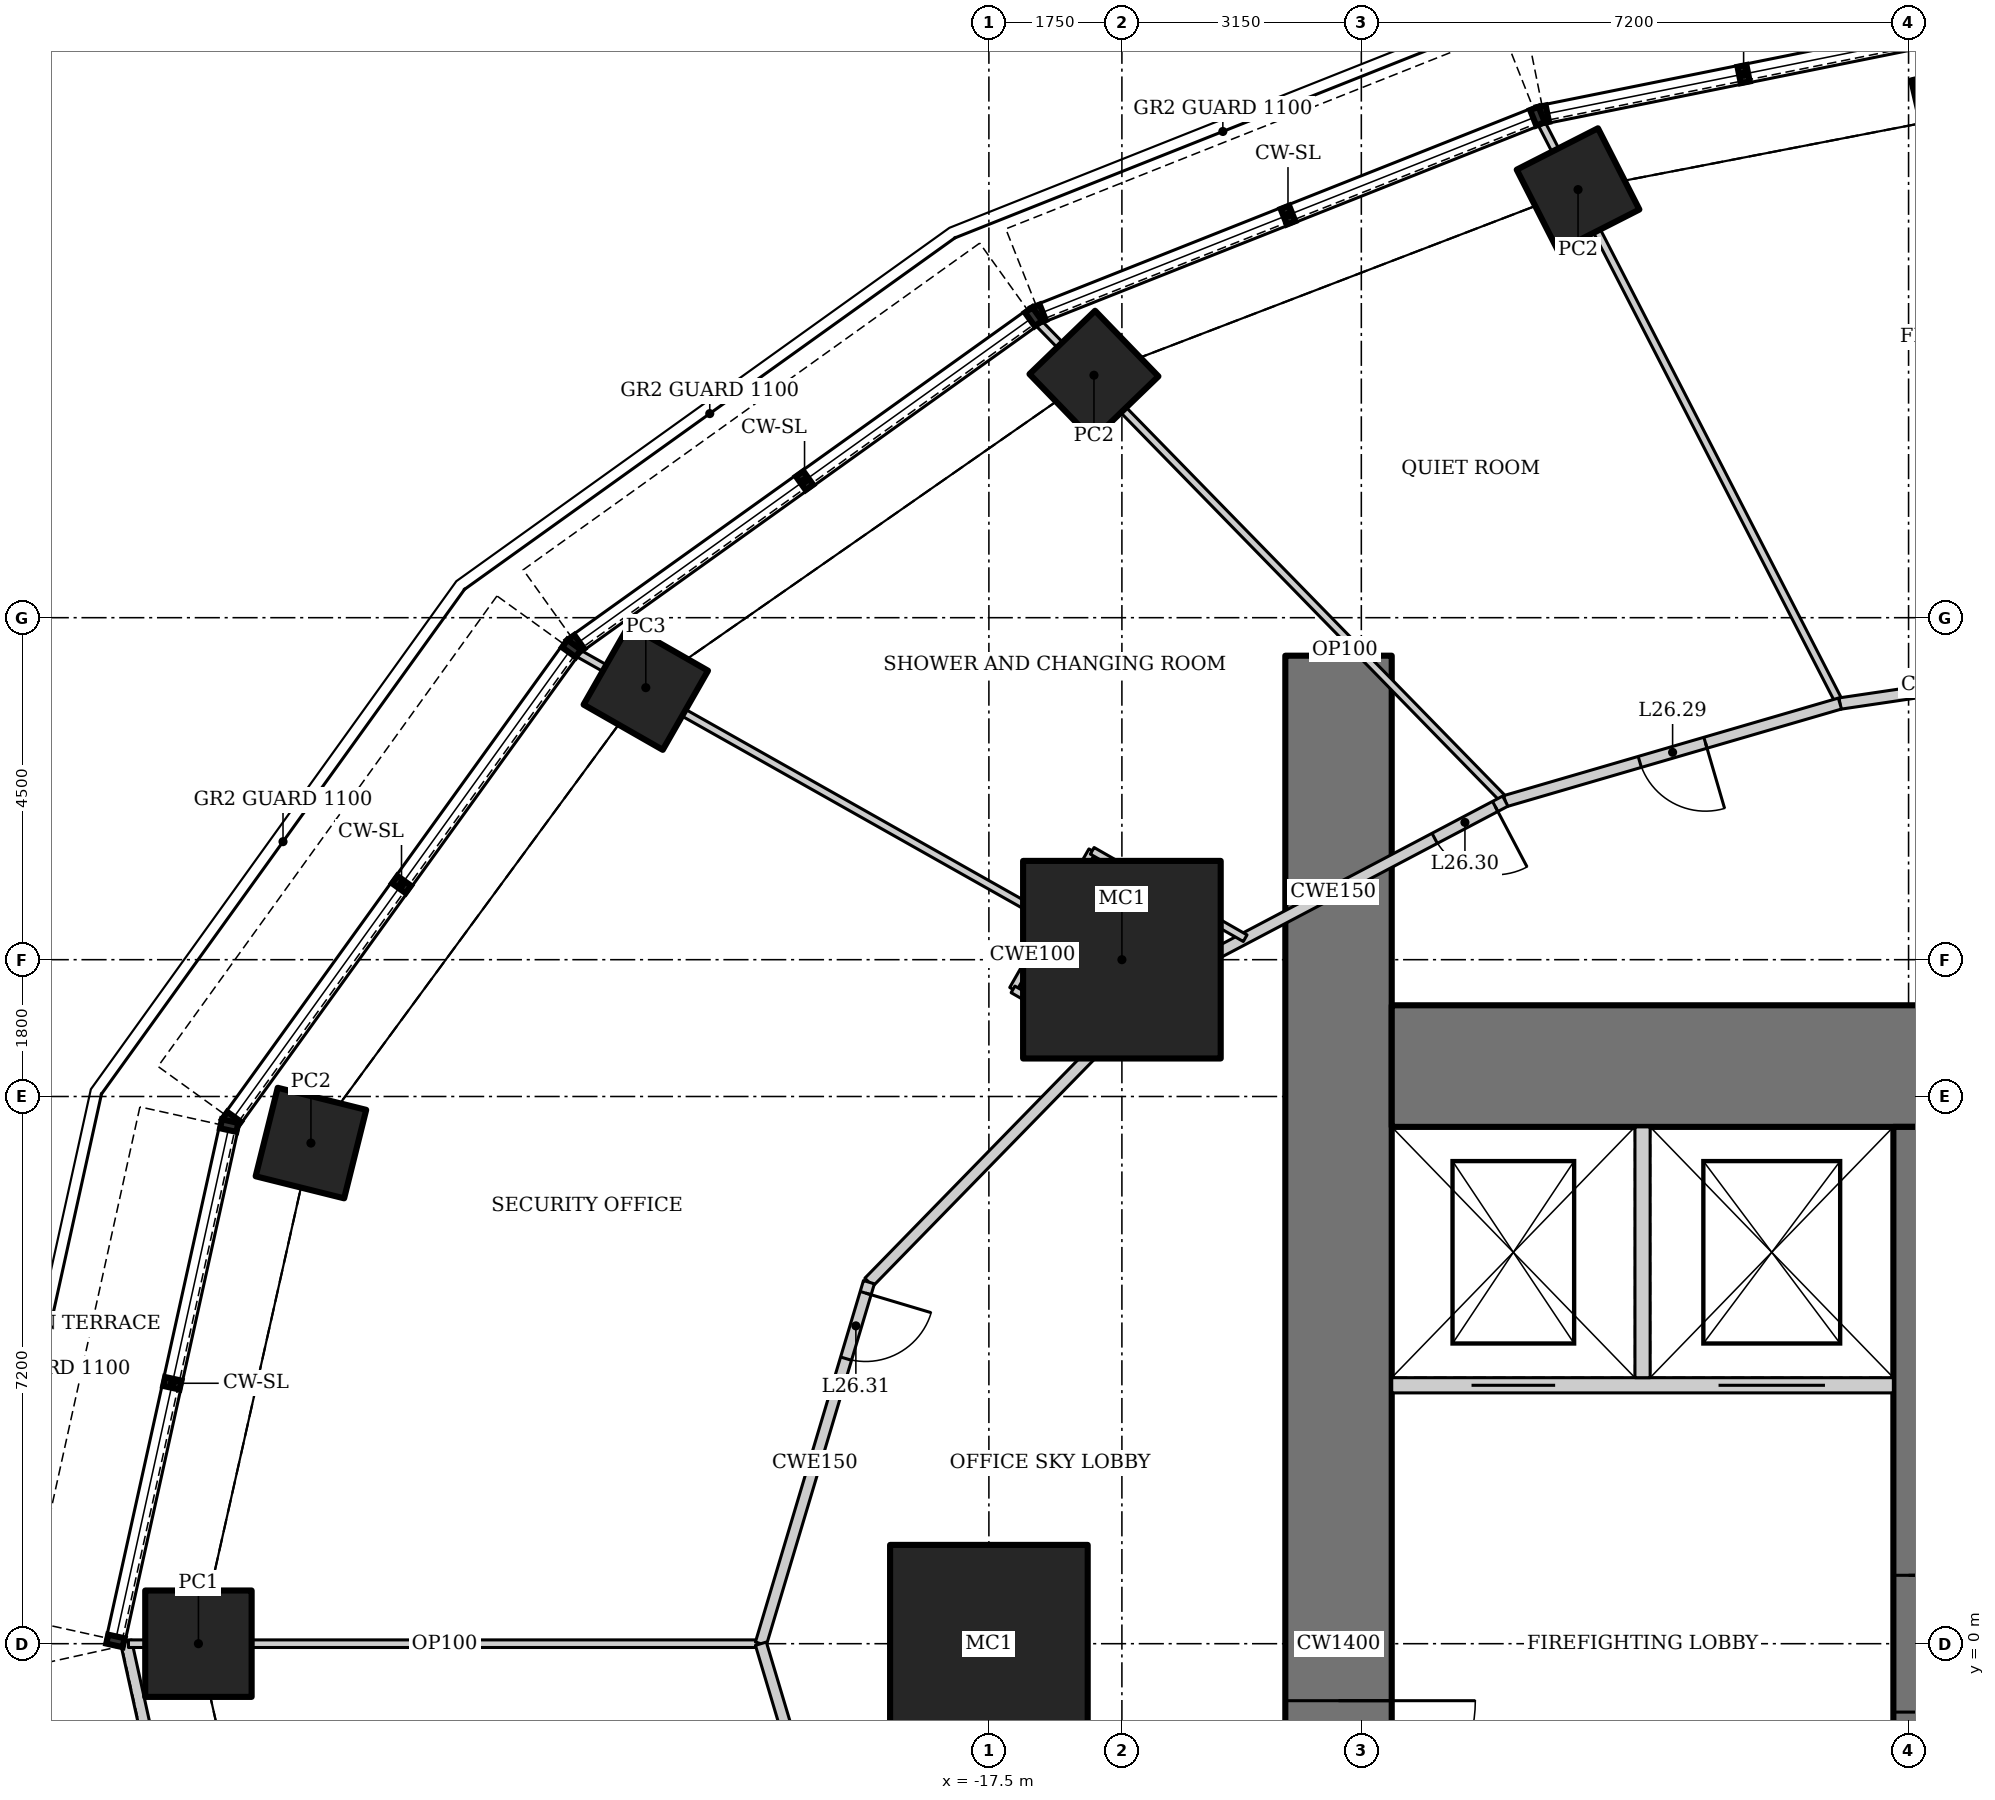
"""IFC4 building model, lengths in metres.
Left out: names, types, materials, properties, quantities, classifications, styles, units other than length and angle.
Written with IfcOpenShell. Run it as: python <this file> out.ifc"""

import sys

from ifc_helpers import new_model, si_unit, direction, frame, frame_2d, origin, origin_2d, place, context, subcontext, project, spatial, rectangle, hollow_rectangle, extrude, element, fill, save


model = new_model("IFC4")
c1 = context("Model", 3, precision=1e-05, world=origin(), true_north=direction((0.0, 1.0)))
c2 = subcontext(c1, "Body", "Model", "MODEL_VIEW")
j1 = project(units=[si_unit("LENGTHUNIT", "METRE"), si_unit("PLANEANGLEUNIT", "RADIAN")], contexts=[c1])
p1 = place(None, origin())
s1 = spatial("IfcSite", under=j1, at=p1, CompositionType="ELEMENT")
p2 = place(p1, origin())
s2 = spatial("IfcBuilding", under=s1, at=p2, CompositionType="ELEMENT")
p3 = place(p2, frame((0.0, 0.0, 111.4)))
s3 = spatial("IfcBuildingStorey", under=s2, at=p3, CompositionType="ELEMENT", Elevation=111.4)
for number, where, z_axis, x_axis in (
    (1, (-15.75, 9.0, 0.0), (0.0, 0.0, 1.0), (1.0, 0.0, 0.0)),
    (2, (-17.5, 0.0, 0.0), (0.0, 0.0, 1.0), (1.0, 0.0, 0.0)),
):
    element("IfcColumn", number, at=place(p3, frame(where, z_axis=z_axis, x_axis=x_axis)), inside=s3, PredefinedType="COLUMN", context=c2, shape_type="SweptSolid", body=[
        extrude(hollow_rectangle(XDim=2.6, YDim=2.6, WallThickness=0.13, at=origin_2d()), origin(), (0.0, 0.0, 1.0), 6.0),
    ])
p4 = place(p3, frame((-4.645, 20.12, 1.17), z_axis=(0.0, 0.0, 1.0), x_axis=(0.974370064785, 0.224951054344, 0.0)))
e3 = element("IfcColumn", 3, at=p4, inside=s3, PredefinedType="COLUMN", context=c2, shape_type="SweptSolid", body=[
    extrude(hollow_rectangle(XDim=1.2, YDim=1.2, WallThickness=0.1, at=origin_2d()), origin(), (0.0, 0.0, 1.0), 4.83),
])
p5 = place(p3, frame((-9.749, 19.133, 1.165), z_axis=(0.0, 0.0, 1.0), x_axis=(0.891006524188, 0.45399049974, 0.0)))
e4 = element("IfcColumn", 4, at=p5, inside=s3, PredefinedType="COLUMN", context=c2, shape_type="SweptSolid", body=[
    extrude(hollow_rectangle(XDim=1.2, YDim=1.2, WallThickness=0.1, at=origin_2d()), origin(), (0.0, 0.0, 1.0), 4.835),
])
p6 = place(p3, frame((-16.118, 16.69, 1.155), z_axis=(0.0, 0.0, 1.0), x_axis=(0.719339800339, 0.694658370459, 0.0)))
e5 = element("IfcColumn", 5, at=p6, inside=s3, PredefinedType="COLUMN", context=c2, shape_type="SweptSolid", body=[
    extrude(hollow_rectangle(XDim=1.2, YDim=1.2, WallThickness=0.1, at=origin_2d()), origin(), (0.0, 0.0, 1.0), 4.845),
])
p7 = place(p3, frame((-22.014, 12.579, 1.142), z_axis=(0.0, 0.0, 1.0), x_axis=(0.496139221777, 0.86824298017, 0.0)))
e6 = element("IfcColumn", 6, at=p7, inside=s3, PredefinedType="COLUMN", context=c2, shape_type="SweptSolid", body=[
    extrude(hollow_rectangle(XDim=1.2, YDim=1.2, WallThickness=0.12, at=origin_2d()), origin(), (0.0, 0.0, 1.0), 4.858),
])
p8 = place(p3, frame((-26.42, 6.587, 1.131), z_axis=(0.0, 0.0, 1.0), x_axis=(0.2419218956, 0.970295726276, 0.0)))
e7 = element("IfcColumn", 7, at=p8, inside=s3, PredefinedType="COLUMN", context=c2, shape_type="SweptSolid", body=[
    extrude(hollow_rectangle(XDim=1.2, YDim=1.2, WallThickness=0.1, at=origin_2d()), origin(), (0.0, 0.0, 1.0), 4.869),
])
p9 = place(p3, frame((-27.9, 0.0, 1.316), z_axis=(0.0, 0.0, 1.0), x_axis=(1.0, 0.0, 0.0)))
e8 = element("IfcColumn", 8, at=p9, inside=s3, PredefinedType="COLUMN", context=c2, shape_type="SweptSolid", body=[
    extrude(hollow_rectangle(XDim=1.4, YDim=1.4, WallThickness=0.1, at=origin_2d()), origin(), (0.0, 0.0, 1.0), 4.684),
])
p10 = place(p3, frame((-12.9, 13.0, 0.0), z_axis=(0.0, 0.0, 1.0), x_axis=(0.0, -1.0, 0.0)))
e9 = element("IfcWall", 9, at=p10, inside=s3, PredefinedType="SHEAR", context=c2, shape_type="SweptSolid", body=[
    extrude(rectangle(XDim=26.0, YDim=1.4, at=frame_2d((13.0, 0.0))), origin(), (0.0, 0.0, 1.0), 6.0),
])
p11 = place(p10, frame((13.75, 0.0, 0.0)))
e10 = element("IfcOpeningElement", 10, at=p11, cuts=e9, PredefinedType="OPENING", context=c2, shape_type="SweptSolid", body=[
    extrude(rectangle(XDim=1.8, YDim=2.1, at=frame_2d((0.9, 1.05))), frame((0.0, 0.71, 0.0), z_axis=(0.0, -1.0, 0.0), x_axis=(1.0, 0.0, 0.0)), (0.0, 0.0, 1.0), 1.42),
])
p12 = place(p3, frame((12.2, 7.6, 0.0), z_axis=(0.0, 0.0, 1.0), x_axis=(-1.0, 0.0, 0.0)))
e11 = element("IfcWall", 11, at=p12, inside=s3, PredefinedType="SHEAR", context=c2, shape_type="SweptSolid", body=[
    extrude(rectangle(XDim=24.4, YDim=1.6, at=frame_2d((12.2, 0.0))), origin(), (0.0, 0.0, 1.0), 6.0),
])
p13 = place(p3, frame((-5.4, 6.8, 0.0), z_axis=(0.0, 0.0, 1.0), x_axis=(0.0, -1.0, 0.0)))
e12 = element("IfcWall", 12, at=p13, inside=s3, PredefinedType="SHEAR", context=c2, shape_type="SweptSolid", body=[
    extrude(rectangle(XDim=13.6, YDim=0.4, at=frame_2d((6.8, 0.0))), origin(), (0.0, 0.0, 1.0), 6.0),
])
p14 = place(p13, frame((5.9, 0.0, 0.0)))
e13 = element("IfcOpeningElement", 13, at=p14, cuts=e12, PredefinedType="OPENING", context=c2, shape_type="SweptSolid", body=[
    extrude(rectangle(XDim=1.8, YDim=2.1, at=frame_2d((0.9, 1.05))), frame((0.0, 0.21, 0.0), z_axis=(0.0, -1.0, 0.0), x_axis=(1.0, 0.0, 0.0)), (0.0, 0.0, 1.0), 0.42),
])
p15 = place(p3, frame((-12.2, 3.4, 0.0), z_axis=(0.0, 0.0, 1.0), x_axis=(1.0, 0.0, 0.0)))
e14 = element("IfcWall", 14, at=p15, inside=s3, PredefinedType="SOLIDWALL", context=c2, shape_type="SweptSolid", body=[
    extrude(rectangle(XDim=6.6, YDim=0.2, at=frame_2d((3.3, 0.0))), origin(), (0.0, 0.0, 1.0), 6.0),
])
p16 = place(p15, frame((1.05, 0.0, 0.0)))
e15 = element("IfcOpeningElement", 15, at=p16, cuts=e14, PredefinedType="OPENING", context=c2, shape_type="SweptSolid", body=[
    extrude(rectangle(XDim=1.1, YDim=2.2, at=frame_2d((0.55, 1.1))), frame((0.0, 0.11, 0.0), z_axis=(0.0, -1.0, 0.0), x_axis=(1.0, 0.0, 0.0)), (0.0, 0.0, 1.0), 0.22),
])
p17 = place(p15, frame((4.3, 0.0, 0.0)))
e16 = element("IfcOpeningElement", 16, at=p17, cuts=e14, PredefinedType="OPENING", context=c2, shape_type="SweptSolid", body=[
    extrude(rectangle(XDim=1.4, YDim=2.2, at=frame_2d((0.7, 1.1))), frame((0.0, 0.11, 0.0), z_axis=(0.0, -1.0, 0.0), x_axis=(1.0, 0.0, 0.0)), (0.0, 0.0, 1.0), 0.22),
])
p18 = place(p3, frame((-8.9, 3.5, 0.0), z_axis=(0.0, 0.0, 1.0), x_axis=(0.0, 1.0, 0.0)))
e17 = element("IfcWall", 17, at=p18, inside=s3, PredefinedType="SOLIDWALL", context=c2, shape_type="SweptSolid", body=[
    extrude(rectangle(XDim=3.3, YDim=0.2, at=frame_2d((1.65, 0.0))), origin(), (0.0, 0.0, 1.0), 6.0),
])
p19 = place(p3, frame((-28.854, 0.032, 0.0), z_axis=(0.0, 0.0, 1.0), x_axis=(0.21553795351, -0.976495463685, 0.0)))
e18 = element("IfcWall", 18, at=p19, inside=s3, PredefinedType="ELEMENTEDWALL", context=c2, shape_type="SweptSolid", body=[
    extrude(rectangle(XDim=7.018, YDim=0.15, at=frame_2d((3.509, 0.0))), origin(), (0.0, 0.0, 1.0), 5.85),
])
p20 = place(p19, frame((2.609, 0.0, 0.0)))
e19 = element("IfcOpeningElement", 19, at=p20, cuts=e18, PredefinedType="OPENING", context=c2, shape_type="SweptSolid", body=[
    extrude(rectangle(XDim=1.8, YDim=2.4, at=frame_2d((0.9, 1.2))), frame((0.0, 0.085, 0.0), z_axis=(0.0, -1.0, 0.0), x_axis=(1.0, 0.0, 0.0)), (0.0, 0.0, 1.0), 0.17),
])
p21 = place(p3, frame((-10.253, 20.052, 0.0), z_axis=(0.0, 0.0, 1.0), x_axis=(0.457326298316, -0.88929896934, 0.0)))
e20 = element("IfcWall", 20, at=p21, inside=s3, PredefinedType="PARTITIONING", context=c2, shape_type="SweptSolid", body=[
    extrude(rectangle(XDim=8.638, YDim=0.1, at=frame_2d((4.319, 0.0))), origin(), (0.0, 0.0, 1.0), 5.081),
])
p22 = place(p3, frame((-16.882, 17.414, 0.0), z_axis=(0.0, 0.0, 1.0), x_axis=(0.698509457669, -0.715600822769, 0.0)))
e21 = element("IfcWall", 21, at=p22, inside=s3, PredefinedType="PARTITIONING", context=c2, shape_type="SweptSolid", body=[
    extrude(rectangle(XDim=8.842, YDim=0.1, at=frame_2d((4.421, 0.0))), origin(), (0.0, 0.0, 1.0), 5.121),
])
p23 = place(p3, frame((-22.949, 13.059, 0.0), z_axis=(0.0, 0.0, 1.0), x_axis=(0.870889908693, -0.491478144923, 0.0)))
e22 = element("IfcWall", 22, at=p23, inside=s3, PredefinedType="PARTITIONING", context=c2, shape_type="SweptSolid", body=[
    extrude(rectangle(XDim=8.865, YDim=0.1, at=frame_2d((4.432, 0.0))), origin(), (0.0, 0.0, 1.0), 4.65),
])
p24 = place(p3, frame((-28.821, 0.0, 0.0), z_axis=(0.0, 0.0, 1.0), x_axis=(1.0, 0.0, 0.0)))
e23 = element("IfcWall", 23, at=p24, inside=s3, PredefinedType="PARTITIONING", context=c2, shape_type="SweptSolid", body=[
    extrude(rectangle(XDim=8.321, YDim=0.1, at=frame_2d((4.16, 0.0))), origin(), (0.0, 0.0, 1.0), 4.65),
])
p25 = place(p3, frame((-2.97, 12.863, 0.0), z_axis=(0.0, 0.0, 1.0), x_axis=(-0.989262902935, -0.146146874329, 0.0)))
e24 = element("IfcWall", 24, at=p25, inside=s3, PredefinedType="PARTITIONING", context=c2, shape_type="SweptSolid", body=[
    extrude(rectangle(XDim=3.369, YDim=0.15, at=frame_2d((1.685, 0.0))), origin(), (0.0, 0.0, 1.0), 5.85),
])
p26 = place(p25, frame((0.15, 0.0, 0.0)))
e25 = element("IfcOpeningElement", 25, at=p26, cuts=e24, PredefinedType="OPENING", context=c2, shape_type="SweptSolid", body=[
    extrude(rectangle(XDim=0.9, YDim=2.1, at=frame_2d((0.45, 1.05))), frame((0.0, 0.085, 0.0), z_axis=(0.0, -1.0, 0.0), x_axis=(1.0, 0.0, 0.0)), (0.0, 0.0, 1.0), 0.17),
])
p27 = place(p3, frame((-6.303, 12.37, 0.0), z_axis=(0.0, 0.0, 1.0), x_axis=(-0.96001728753, -0.279940721659, 0.0)))
e26 = element("IfcWall", 26, at=p27, inside=s3, PredefinedType="PARTITIONING", context=c2, shape_type="SweptSolid", body=[
    extrude(rectangle(XDim=4.586, YDim=0.15, at=frame_2d((2.293, 0.0))), origin(), (0.0, 0.0, 1.0), 5.85),
])
p28 = place(p27, frame((1.843, 0.0, 0.0)))
e27 = element("IfcOpeningElement", 27, at=p28, cuts=e26, PredefinedType="OPENING", context=c2, shape_type="SweptSolid", body=[
    extrude(rectangle(XDim=0.9, YDim=2.1, at=frame_2d((0.45, 1.05))), frame((0.0, 0.085, 0.0), z_axis=(0.0, -1.0, 0.0), x_axis=(1.0, 0.0, 0.0)), (0.0, 0.0, 1.0), 0.17),
])
p29 = place(p3, frame((-10.706, 11.086, 0.0), z_axis=(0.0, 0.0, 1.0), x_axis=(-0.884643590306, -0.466267860924, 0.0)))
e28 = element("IfcWall", 28, at=p29, inside=s3, PredefinedType="PARTITIONING", context=c2, shape_type="SweptSolid", body=[
    extrude(rectangle(XDim=5.113, YDim=0.15, at=frame_2d((2.557, 0.0))), origin(), (0.0, 0.0, 1.0), 5.85),
])
p30 = place(p29, frame((0.15, 0.0, 0.0)))
e29 = element("IfcOpeningElement", 29, at=p30, cuts=e28, PredefinedType="OPENING", context=c2, shape_type="SweptSolid", body=[
    extrude(rectangle(XDim=0.9, YDim=2.1, at=frame_2d((0.45, 1.05))), frame((0.0, 0.085, 0.0), z_axis=(0.0, -1.0, 0.0), x_axis=(1.0, 0.0, 0.0)), (0.0, 0.0, 1.0), 0.17),
])
p31 = place(p3, frame((-15.229, 8.702, 0.0), z_axis=(0.0, 0.0, 1.0), x_axis=(-0.698305033542, -0.715800307439, 0.0)))
e30 = element("IfcWall", 30, at=p31, inside=s3, PredefinedType="PARTITIONING", context=c2, shape_type="SweptSolid", body=[
    extrude(rectangle(XDim=5.512, YDim=0.15, at=frame_2d((2.756, 0.0))), origin(), (0.0, 0.0, 1.0), 5.85),
])
p32 = place(p3, frame((-19.078, 4.757, 0.0), z_axis=(0.0, 0.0, 1.0), x_axis=(-0.286346182056, -0.958126225516, 0.0)))
e31 = element("IfcWall", 31, at=p32, inside=s3, PredefinedType="PARTITIONING", context=c2, shape_type="SweptSolid", body=[
    extrude(rectangle(XDim=4.965, YDim=0.15, at=frame_2d((2.482, 0.0))), origin(), (0.0, 0.0, 1.0), 5.85),
])
p33 = place(p32, frame((0.15, 0.0, 0.0)))
e32 = element("IfcOpeningElement", 32, at=p33, cuts=e31, PredefinedType="OPENING", context=c2, shape_type="SweptSolid", body=[
    extrude(rectangle(XDim=0.9, YDim=2.1, at=frame_2d((0.45, 1.05))), frame((0.0, 0.085, 0.0), z_axis=(0.0, -1.0, 0.0), x_axis=(1.0, 0.0, 0.0)), (0.0, 0.0, 1.0), 0.17),
])
p34 = place(p3, frame((-20.5, 0.0, 0.0), z_axis=(0.0, 0.0, 1.0), x_axis=(0.286346182056, -0.958126225516, 0.0)))
e33 = element("IfcWall", 33, at=p34, inside=s3, PredefinedType="PARTITIONING", context=c2, shape_type="SweptSolid", body=[
    extrude(rectangle(XDim=4.965, YDim=0.15, at=frame_2d((2.482, 0.0))), origin(), (0.0, 0.0, 1.0), 5.85),
])
p35 = place(p3, frame((-17.183, 8.609, 0.0), z_axis=(0.0, 0.0, 1.0), x_axis=(0.49623995811, 0.868185408755, 0.0)))
e34 = element("IfcWall", 34, at=p35, inside=s3, PredefinedType="PARTITIONING", context=c2, shape_type="SweptSolid", body=[
    extrude(rectangle(XDim=1.041, YDim=0.1, at=frame_2d((0.521, 0.0))), origin(), (0.0, 0.0, 1.0), 5.85),
])
for number, where, z_axis, x_axis in (
    (35, (-16.662, 9.521, 0.0), (0.0, 0.0, 1.0), (0.496, 0.868, 0.0)),
    (36, (-16.141, 10.433, 0.0), (0.0, 0.0, 1.0), (0.868, -0.496, 0.0)),
):
    element("IfcWall", number, at=place(p3, frame(where, z_axis=z_axis, x_axis=x_axis)), inside=s3, PredefinedType="PARTITIONING", context=c2, shape_type="SweptSolid", body=[
        extrude(rectangle(XDim=1.05, YDim=0.1, at=frame_2d((0.525, 0.0))), origin(), (0.0, 0.0, 1.0), 5.85),
    ])
p36 = place(p3, frame((-15.229, 9.912, 0.0), z_axis=(0.0, 0.0, 1.0), x_axis=(0.868290539594, -0.496055983587, 0.0)))
e37 = element("IfcWall", 37, at=p36, inside=s3, PredefinedType="PARTITIONING", context=c2, shape_type="SweptSolid", body=[
    extrude(rectangle(XDim=1.268, YDim=0.1, at=frame_2d((0.634, 0.0))), origin(), (0.0, 0.0, 1.0), 5.85),
])
p37 = place(p3, frame((-15.987, 7.926, 0.0), z_axis=(0.0, 0.0, 1.0), x_axis=(-0.868289043195, 0.496058602856, 0.0)))
e38 = element("IfcWall", 38, at=p37, inside=s3, PredefinedType="PARTITIONING", context=c2, shape_type="SweptSolid", body=[
    extrude(rectangle(XDim=0.327, YDim=0.1, at=frame_2d((0.164, 0.0))), origin(), (0.0, 0.0, 1.0), 5.85),
])
p38 = place(p3, frame((-16.271, 8.088, 0.0), z_axis=(0.0, 0.0, 1.0), x_axis=(-0.868214523334, 0.496189017888, 0.0)))
e39 = element("IfcWall", 39, at=p38, inside=s3, PredefinedType="PARTITIONING", context=c2, shape_type="SweptSolid", body=[
    extrude(rectangle(XDim=1.05, YDim=0.1, at=frame_2d((0.525, 0.0))), origin(), (0.0, 0.0, 1.0), 5.85),
])
p39 = place(p3, frame((-12.9, 13.0, 0.0), z_axis=(0.0, 0.0, 1.0), x_axis=(0.715424812506, 0.698689729172, 0.0)))
e40 = element("IfcWall", 40, at=p39, inside=s3, PredefinedType="PARTITIONING", context=c2, shape_type="SweptSolid", body=[
    extrude(rectangle(XDim=0.233, YDim=0.1, at=frame_2d((0.117, 0.0))), origin(), (0.0, 0.0, 1.0), 5.85),
])
p40 = place(p14, origin())
e41 = element("IfcDoor", 41, at=p40, inside=s3, OperationType="DOUBLE_DOOR_DOUBLE_SWING", PredefinedType="DOOR", context=c2, shape_type="SweptSolid", body=[
    extrude(rectangle(XDim=1.8, YDim=2.1, at=frame_2d((0.9, 1.05))), frame((0.0, 0.025, 0.0), z_axis=(0.0, -1.0, 0.0), x_axis=(1.0, 0.0, 0.0)), (0.0, 0.0, 1.0), 0.05),
])
fill(e13, e41)
p41 = place(p11, origin())
e42 = element("IfcDoor", 42, at=p41, inside=s3, OperationType="DOUBLE_DOOR_DOUBLE_SWING", PredefinedType="DOOR", context=c2, shape_type="SweptSolid", body=[
    extrude(rectangle(XDim=1.8, YDim=2.1, at=frame_2d((0.9, 1.05))), frame((0.0, 0.025, 0.0), z_axis=(0.0, -1.0, 0.0), x_axis=(1.0, 0.0, 0.0)), (0.0, 0.0, 1.0), 0.05),
])
fill(e10, e42)
p42 = place(p16, origin())
e43 = element("IfcDoor", 43, at=p42, inside=s3, OperationType="DOUBLE_DOOR_SLIDING", PredefinedType="DOOR", context=c2, shape_type="SweptSolid", body=[
    extrude(rectangle(XDim=1.1, YDim=2.2, at=frame_2d((0.55, 1.1))), frame((0.0, 0.025, 0.0), z_axis=(0.0, -1.0, 0.0), x_axis=(1.0, 0.0, 0.0)), (0.0, 0.0, 1.0), 0.05),
])
fill(e15, e43)
p43 = place(p17, origin())
e44 = element("IfcDoor", 44, at=p43, inside=s3, OperationType="DOUBLE_DOOR_SLIDING", PredefinedType="DOOR", context=c2, shape_type="SweptSolid", body=[
    extrude(rectangle(XDim=1.4, YDim=2.2, at=frame_2d((0.7, 1.1))), frame((0.0, 0.025, 0.0), z_axis=(0.0, -1.0, 0.0), x_axis=(1.0, 0.0, 0.0)), (0.0, 0.0, 1.0), 0.05),
])
fill(e16, e44)
p44 = place(p28, origin())
e45 = element("IfcDoor", 45, at=p44, inside=s3, OperationType="SINGLE_SWING_LEFT", PredefinedType="DOOR", context=c2, shape_type="SweptSolid", body=[
    extrude(rectangle(XDim=0.9, YDim=2.1, at=frame_2d((0.45, 1.05))), frame((0.0, 0.025, 0.0), z_axis=(0.0, -1.0, 0.0), x_axis=(1.0, 0.0, 0.0)), (0.0, 0.0, 1.0), 0.05),
])
fill(e27, e45)
p45 = place(p30, origin())
e46 = element("IfcDoor", 46, at=p45, inside=s3, OperationType="SINGLE_SWING_LEFT", PredefinedType="DOOR", context=c2, shape_type="SweptSolid", body=[
    extrude(rectangle(XDim=0.9, YDim=2.1, at=frame_2d((0.45, 1.05))), frame((0.0, 0.025, 0.0), z_axis=(0.0, -1.0, 0.0), x_axis=(1.0, 0.0, 0.0)), (0.0, 0.0, 1.0), 0.05),
])
fill(e29, e46)
p46 = place(p33, origin())
e47 = element("IfcDoor", 47, at=p46, inside=s3, OperationType="SINGLE_SWING_LEFT", PredefinedType="DOOR", context=c2, shape_type="SweptSolid", body=[
    extrude(rectangle(XDim=0.9, YDim=2.1, at=frame_2d((0.45, 1.05))), frame((0.0, 0.025, 0.0), z_axis=(0.0, -1.0, 0.0), x_axis=(1.0, 0.0, 0.0)), (0.0, 0.0, 1.0), 0.05),
])
fill(e32, e47)
save(model, sys.argv[1])
